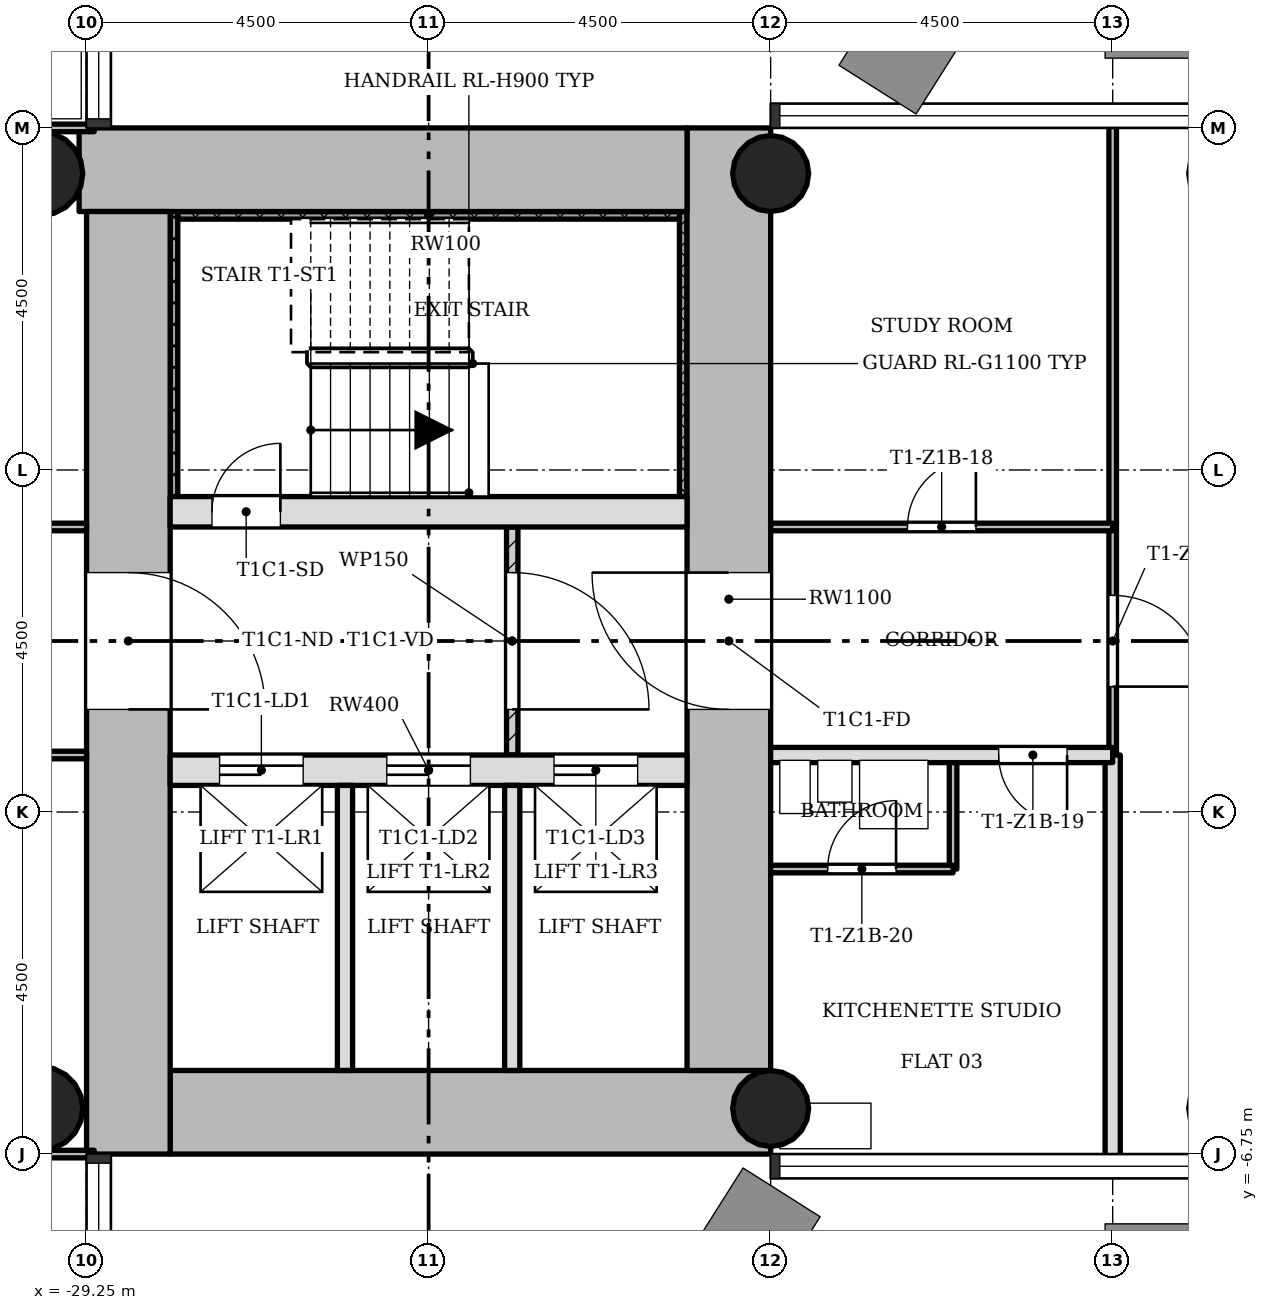
"""IFC4 building model, lengths in metres.
Left out: names, types, materials, properties, quantities, classifications, styles, units other than length and angle.
Written with IfcOpenShell. Run it as: python <this file> out.ifc"""

import sys

from ifc_helpers import new_model, si_unit, direction, frame, frame_2d, origin, origin_2d, place, context, subcontext, project, spatial, rectangle, hollow_circle, extrude, element, fill, save


model = new_model("IFC4")
c1 = context("Model", 3, precision=1e-05, world=origin(), true_north=direction((0.0, 1.0)))
c2 = subcontext(c1, "Body", "Model", "MODEL_VIEW")
j1 = project(units=[si_unit("LENGTHUNIT", "METRE"), si_unit("PLANEANGLEUNIT", "RADIAN")], contexts=[c1])
p1 = place(None, origin())
s1 = spatial("IfcSite", under=j1, at=p1, CompositionType="ELEMENT")
p2 = place(p1, origin())
s2 = spatial("IfcBuilding", under=s1, at=p2, CompositionType="ELEMENT")
p3 = place(p2, frame((0.0, 0.0, 38.1)))
s3 = spatial("IfcBuildingStorey", under=s2, at=p3, CompositionType="ELEMENT", Elevation=38.1)
p4 = place(p3, frame((-28.15, -6.2, 0.0), z_axis=(0.0, 0.0, 1.0), x_axis=(1.0, 0.0, 0.0)))
e1 = element("IfcWall", 1, at=p4, inside=s3, PredefinedType="SHEAR", context=c2, shape_type="SweptSolid", body=[
    extrude(rectangle(XDim=7.9, YDim=1.1, at=frame_2d((3.95, 0.0))), origin(), (0.0, 0.0, 1.0), 3.4),
])
p5 = place(p3, frame((-20.8, -5.65, 0.0), z_axis=(0.0, 0.0, 1.0), x_axis=(0.0, 1.0, 0.0)))
e2 = element("IfcWall", 2, at=p5, inside=s3, PredefinedType="SHEAR", context=c2, shape_type="SweptSolid", body=[
    extrude(rectangle(XDim=12.4, YDim=1.1, at=frame_2d((6.2, 0.0))), origin(), (0.0, 0.0, 1.0), 3.4),
])
p6 = place(p5, frame((4.75, 0.0, 0.0)))
e3 = element("IfcOpeningElement", 3, at=p6, cuts=e2, PredefinedType="OPENING", context=c2, shape_type="SweptSolid", body=[
    extrude(rectangle(XDim=1.8, YDim=2.1, at=frame_2d((0.9, 1.05))), frame((0.0, 0.56, 0.0), z_axis=(0.0, -1.0, 0.0), x_axis=(1.0, 0.0, 0.0)), (0.0, 0.0, 1.0), 1.12),
])
p7 = place(p3, frame((-21.35, 6.2, 0.0), z_axis=(0.0, 0.0, 1.0), x_axis=(-1.0, 0.0, 0.0)))
e4 = element("IfcWall", 4, at=p7, inside=s3, PredefinedType="SHEAR", context=c2, shape_type="SweptSolid", body=[
    extrude(rectangle(XDim=7.998, YDim=1.1, at=frame_2d((3.999, 0.0))), origin(), (0.0, 0.0, 1.0), 3.4),
])
p8 = place(p3, frame((-28.7, 5.65, 0.0), z_axis=(0.0, 0.0, 1.0), x_axis=(0.0, -1.0, 0.0)))
e5 = element("IfcWall", 5, at=p8, inside=s3, PredefinedType="SHEAR", context=c2, shape_type="SweptSolid", body=[
    extrude(rectangle(XDim=12.4, YDim=1.1, at=frame_2d((6.2, 0.0))), origin(), (0.0, 0.0, 1.0), 3.4),
])
p9 = place(p8, frame((4.75, 0.0, 0.0)))
e6 = element("IfcOpeningElement", 6, at=p9, cuts=e5, PredefinedType="OPENING", context=c2, shape_type="SweptSolid", body=[
    extrude(rectangle(XDim=1.8, YDim=2.1, at=frame_2d((0.9, 1.05))), frame((0.0, 0.56, 0.0), z_axis=(0.0, -1.0, 0.0), x_axis=(1.0, 0.0, 0.0)), (0.0, 0.0, 1.0), 1.12),
])
p10 = place(p3, frame((-28.15, -1.7, 0.0), z_axis=(0.0, 0.0, 1.0), x_axis=(1.0, 0.0, 0.0)))
e7 = element("IfcWall", 7, at=p10, inside=s3, PredefinedType="SHEAR", context=c2, shape_type="SweptSolid", body=[
    extrude(rectangle(XDim=6.8, YDim=0.4, at=frame_2d((3.4, 0.0))), origin(), (0.0, 0.0, 1.0), 3.4),
])
p11 = place(p10, frame((0.65, 0.0, 0.0)))
e8 = element("IfcOpeningElement", 8, at=p11, cuts=e7, PredefinedType="OPENING", context=c2, shape_type="SweptSolid", body=[
    extrude(rectangle(XDim=1.1, YDim=2.1, at=frame_2d((0.55, 1.05))), frame((0.0, 0.21, 0.0), z_axis=(0.0, -1.0, 0.0), x_axis=(1.0, 0.0, 0.0)), (0.0, 0.0, 1.0), 0.42),
])
p12 = place(p10, frame((2.85, 0.0, 0.0)))
e9 = element("IfcOpeningElement", 9, at=p12, cuts=e7, PredefinedType="OPENING", context=c2, shape_type="SweptSolid", body=[
    extrude(rectangle(XDim=1.1, YDim=2.1, at=frame_2d((0.55, 1.05))), frame((0.0, 0.21, 0.0), z_axis=(0.0, -1.0, 0.0), x_axis=(1.0, 0.0, 0.0)), (0.0, 0.0, 1.0), 0.42),
])
p13 = place(p10, frame((5.05, 0.0, 0.0)))
e10 = element("IfcOpeningElement", 10, at=p13, cuts=e7, PredefinedType="OPENING", context=c2, shape_type="SweptSolid", body=[
    extrude(rectangle(XDim=1.1, YDim=2.1, at=frame_2d((0.55, 1.05))), frame((0.0, 0.21, 0.0), z_axis=(0.0, -1.0, 0.0), x_axis=(1.0, 0.0, 0.0)), (0.0, 0.0, 1.0), 0.42),
])
p14 = place(p3, frame((-28.15, 1.7, 0.0), z_axis=(0.0, 0.0, 1.0), x_axis=(1.0, 0.0, 0.0)))
e11 = element("IfcWall", 11, at=p14, inside=s3, PredefinedType="SHEAR", context=c2, shape_type="SweptSolid", body=[
    extrude(rectangle(XDim=6.8, YDim=0.4, at=frame_2d((3.4, 0.0))), origin(), (0.0, 0.0, 1.0), 3.4),
])
p15 = place(p14, frame((0.55, 0.0, 0.0)))
e12 = element("IfcOpeningElement", 12, at=p15, cuts=e11, PredefinedType="OPENING", context=c2, shape_type="SweptSolid", body=[
    extrude(rectangle(XDim=0.9, YDim=2.1, at=frame_2d((0.45, 1.05))), frame((0.0, 0.21, 0.0), z_axis=(0.0, -1.0, 0.0), x_axis=(1.0, 0.0, 0.0)), (0.0, 0.0, 1.0), 0.42),
])
for number, where, z_axis, x_axis in (
    (13, (-20.25, -6.15, 0.0), (0.0, 0.0, 1.0), (1.0, 0.0, 0.0)),
    (14, (-20.25, 6.15, 0.0), (0.0, 0.0, 1.0), (1.0, 0.0, 0.0)),
):
    element("IfcColumn", number, at=place(p3, frame(where, z_axis=z_axis, x_axis=x_axis)), inside=s3, PredefinedType="COLUMN", context=c2, shape_type="SweptSolid", body=[
        extrude(hollow_circle(Radius=0.5, WallThickness=0.036, at=origin_2d()), origin(), (0.0, 0.0, 1.0), 3.4),
    ])
for number, where, z_axis, x_axis in (
    (15, (-29.85, -6.15, 0.0), (0.0, 0.0, 1.0), (1.0, 0.0, 0.0)),
    (16, (-29.85, 6.15, 0.0), (0.0, 0.0, 1.0), (1.0, 0.0, 0.0)),
):
    element("IfcColumn", number, at=place(p3, frame(where, z_axis=z_axis, x_axis=x_axis)), inside=s3, PredefinedType="COLUMN", context=c2, shape_type="SweptSolid", body=[
        extrude(hollow_circle(Radius=0.55, WallThickness=0.04, at=origin_2d()), origin(), (0.0, 0.0, 1.0), 3.4),
    ])
p16 = place(p3, frame((-23.65, -1.5, 0.0), z_axis=(0.0, 0.0, 1.0), x_axis=(0.0, 1.0, 0.0)))
e17 = element("IfcWall", 17, at=p16, inside=s3, PredefinedType="PARTITIONING", context=c2, shape_type="SweptSolid", body=[
    extrude(rectangle(XDim=3.0, YDim=0.15, at=frame_2d((1.5, 0.0))), origin(), (0.0, 0.0, 1.0), 3.0),
])
p17 = place(p16, frame((0.6, 0.0, 0.0)))
e18 = element("IfcOpeningElement", 18, at=p17, cuts=e17, PredefinedType="OPENING", context=c2, shape_type="SweptSolid", body=[
    extrude(rectangle(XDim=1.8, YDim=2.1, at=frame_2d((0.9, 1.05))), frame((0.0, 0.085, 0.0), z_axis=(0.0, -1.0, 0.0), x_axis=(1.0, 0.0, 0.0)), (0.0, 0.0, 1.0), 0.17),
])
for number, where, z_axis, x_axis in (
    (19, (-25.85, -5.65, 0.0), (0.0, 0.0, 1.0), (0.0, 1.0, 0.0)),
    (20, (-23.65, -5.65, 0.0), (0.0, 0.0, 1.0), (0.0, 1.0, 0.0)),
):
    element("IfcWall", number, at=place(p3, frame(where, z_axis=z_axis, x_axis=x_axis)), inside=s3, PredefinedType="SOLIDWALL", context=c2, shape_type="SweptSolid", body=[
        extrude(rectangle(XDim=3.75, YDim=0.2, at=frame_2d((1.875, 0.0))), origin(), (0.0, 0.0, 1.0), 3.0),
    ])
p18 = place(p3, frame((-17.85, -3.0, 0.0), z_axis=(0.0, 0.0, 1.0), x_axis=(0.0, 1.0, 0.0)))
e21 = element("IfcWall", 21, at=p18, inside=s3, PredefinedType="PARTITIONING", context=c2, shape_type="SweptSolid", body=[
    extrude(rectangle(XDim=1.5, YDim=0.1, at=frame_2d((0.75, 0.0))), origin(), (0.0, 0.0, 1.0), 3.0),
])
p19 = place(p3, frame((-15.75, -1.5, 0.0), z_axis=(0.0, 0.0, 1.0), x_axis=(0.0, 1.0, 0.0)))
e22 = element("IfcWall", 22, at=p19, inside=s3, PredefinedType="PARTITIONING", context=c2, shape_type="SweptSolid", body=[
    extrude(rectangle(XDim=8.35, YDim=0.1, at=frame_2d((4.175, 0.0))), origin(), (0.0, 0.0, 1.0), 3.0),
])
p20 = place(p19, frame((0.9, 0.0, 0.0)))
e23 = element("IfcOpeningElement", 23, at=p20, cuts=e22, PredefinedType="OPENING", context=c2, shape_type="SweptSolid", body=[
    extrude(rectangle(XDim=1.2, YDim=2.1, at=frame_2d((0.6, 1.05))), frame((0.0, 0.06, 0.0), z_axis=(0.0, -1.0, 0.0), x_axis=(1.0, 0.0, 0.0)), (0.0, 0.0, 1.0), 0.12),
])
p21 = place(p3, frame((-15.75, -6.85, 0.0), z_axis=(0.0, 0.0, 1.0), x_axis=(0.0, 1.0, 0.0)))
e24 = element("IfcWall", 24, at=p21, inside=s3, PredefinedType="SOLIDWALL", context=c2, shape_type="SweptSolid", body=[
    extrude(rectangle(XDim=5.35, YDim=0.2, at=frame_2d((2.675, 0.0))), origin(), (0.0, 0.0, 1.0), 3.0),
])
p22 = place(p3, frame((-35.1, -6.75, 0.0), z_axis=(0.0, 0.0, 1.0), x_axis=(1.0, 0.0, 0.0)))
e25 = element("IfcWall", 25, at=p22, inside=s3, PredefinedType="PARTITIONING", context=c2, shape_type="SweptSolid", body=[
    extrude(rectangle(XDim=5.95, YDim=0.1, at=frame_2d((2.975, 0.0))), origin(), (0.0, 0.0, 1.0), 3.0),
])
p23 = place(p3, frame((-20.25, -3.0, 0.0), z_axis=(0.0, 0.0, 1.0), x_axis=(1.0, 0.0, 0.0)))
e26 = element("IfcWall", 26, at=p23, inside=s3, PredefinedType="PARTITIONING", context=c2, shape_type="SweptSolid", body=[
    extrude(rectangle(XDim=2.4, YDim=0.1, at=frame_2d((1.2, 0.0))), origin(), (0.0, 0.0, 1.0), 3.0),
])
p24 = place(p23, frame((0.75, 0.0, 0.0)))
e27 = element("IfcOpeningElement", 27, at=p24, cuts=e26, PredefinedType="OPENING", context=c2, shape_type="SweptSolid", body=[
    extrude(rectangle(XDim=0.9, YDim=2.1, at=frame_2d((0.45, 1.05))), frame((0.0, 0.06, 0.0), z_axis=(0.0, -1.0, 0.0), x_axis=(1.0, 0.0, 0.0)), (0.0, 0.0, 1.0), 0.12),
])
p25 = place(p3, frame((-35.1, -1.5, 0.0), z_axis=(0.0, 0.0, 1.0), x_axis=(1.0, 0.0, 0.0)))
e28 = element("IfcWall", 28, at=p25, inside=s3, PredefinedType="PARTITIONING", context=c2, shape_type="SweptSolid", body=[
    extrude(rectangle(XDim=5.85, YDim=0.1, at=frame_2d((2.925, 0.0))), origin(), (0.0, 0.0, 1.0), 3.0),
])
p26 = place(p25, frame((2.475, 0.0, 0.0)))
e29 = element("IfcOpeningElement", 29, at=p26, cuts=e28, PredefinedType="OPENING", context=c2, shape_type="SweptSolid", body=[
    extrude(rectangle(XDim=0.9, YDim=2.1, at=frame_2d((0.45, 1.05))), frame((0.0, 0.06, 0.0), z_axis=(0.0, -1.0, 0.0), x_axis=(1.0, 0.0, 0.0)), (0.0, 0.0, 1.0), 0.12),
])
p27 = place(p3, frame((-20.25, -1.5, 0.0), z_axis=(0.0, 0.0, 1.0), x_axis=(1.0, 0.0, 0.0)))
e30 = element("IfcWall", 30, at=p27, inside=s3, PredefinedType="SOLIDWALL", context=c2, shape_type="SweptSolid", body=[
    extrude(rectangle(XDim=4.5, YDim=0.2, at=frame_2d((2.25, 0.0))), origin(), (0.0, 0.0, 1.0), 3.0),
])
p28 = place(p27, frame((3.0, 0.0, 0.0)))
e31 = element("IfcOpeningElement", 31, at=p28, cuts=e30, PredefinedType="OPENING", context=c2, shape_type="SweptSolid", body=[
    extrude(rectangle(XDim=0.9, YDim=2.1, at=frame_2d((0.45, 1.05))), frame((0.0, 0.11, 0.0), z_axis=(0.0, -1.0, 0.0), x_axis=(1.0, 0.0, 0.0)), (0.0, 0.0, 1.0), 0.22),
])
p29 = place(p3, frame((-35.1, 1.5, 0.0), z_axis=(0.0, 0.0, 1.0), x_axis=(1.0, 0.0, 0.0)))
e32 = element("IfcWall", 32, at=p29, inside=s3, PredefinedType="PARTITIONING", context=c2, shape_type="SweptSolid", body=[
    extrude(rectangle(XDim=5.85, YDim=0.1, at=frame_2d((2.925, 0.0))), origin(), (0.0, 0.0, 1.0), 3.0),
])
p30 = place(p29, frame((3.375, 0.0, 0.0)))
e33 = element("IfcOpeningElement", 33, at=p30, cuts=e32, PredefinedType="OPENING", context=c2, shape_type="SweptSolid", body=[
    extrude(rectangle(XDim=0.9, YDim=2.1, at=frame_2d((0.45, 1.05))), frame((0.0, 0.06, 0.0), z_axis=(0.0, -1.0, 0.0), x_axis=(1.0, 0.0, 0.0)), (0.0, 0.0, 1.0), 0.12),
])
p31 = place(p3, frame((-20.25, 1.5, 0.0), z_axis=(0.0, 0.0, 1.0), x_axis=(1.0, 0.0, 0.0)))
e34 = element("IfcWall", 34, at=p31, inside=s3, PredefinedType="PARTITIONING", context=c2, shape_type="SweptSolid", body=[
    extrude(rectangle(XDim=4.5, YDim=0.1, at=frame_2d((2.25, 0.0))), origin(), (0.0, 0.0, 1.0), 3.0),
])
p32 = place(p31, frame((1.8, 0.0, 0.0)))
e35 = element("IfcOpeningElement", 35, at=p32, cuts=e34, PredefinedType="OPENING", context=c2, shape_type="SweptSolid", body=[
    extrude(rectangle(XDim=0.9, YDim=2.1, at=frame_2d((0.45, 1.05))), frame((0.0, 0.06, 0.0), z_axis=(0.0, -1.0, 0.0), x_axis=(1.0, 0.0, 0.0)), (0.0, 0.0, 1.0), 0.12),
])
p33 = place(p3, frame((-35.1, 6.75, 0.0), z_axis=(0.0, 0.0, 1.0), x_axis=(1.0, 0.0, 0.0)))
e36 = element("IfcWall", 36, at=p33, inside=s3, PredefinedType="PARTITIONING", context=c2, shape_type="SweptSolid", body=[
    extrude(rectangle(XDim=5.95, YDim=0.1, at=frame_2d((2.975, 0.0))), origin(), (0.0, 0.0, 1.0), 3.0),
])
p34 = place(p3, frame((-21.4, 1.9, 0.0), z_axis=(0.0, 0.0, 1.0), x_axis=(0.0, 1.0, 0.0)))
e37 = element("IfcWall", 37, at=p34, inside=s3, PredefinedType="SHEAR", context=c2, shape_type="SweptSolid", body=[
    extrude(rectangle(XDim=3.75, YDim=0.1, at=frame_2d((1.875, 0.0))), origin(), (0.0, 0.0, 1.0), 3.4),
])
p35 = place(p3, frame((-28.05, 5.6, 0.0), z_axis=(0.0, 0.0, 1.0), x_axis=(1.0, 0.0, 0.0)))
e38 = element("IfcWall", 38, at=p35, inside=s3, PredefinedType="SHEAR", context=c2, shape_type="SweptSolid", body=[
    extrude(rectangle(XDim=6.6, YDim=0.1, at=frame_2d((3.3, 0.0))), origin(), (0.0, 0.0, 1.0), 3.4),
])
p36 = place(p3, frame((-28.1, 1.9, 0.0), z_axis=(0.0, 0.0, 1.0), x_axis=(0.0, 1.0, 0.0)))
e39 = element("IfcWall", 39, at=p36, inside=s3, PredefinedType="SHEAR", context=c2, shape_type="SweptSolid", body=[
    extrude(rectangle(XDim=3.75, YDim=0.1, at=frame_2d((1.875, 0.0))), origin(), (0.0, 0.0, 1.0), 3.4),
])
p37 = place(p17, origin())
e40 = element("IfcDoor", 40, at=p37, inside=s3, OperationType="SINGLE_SWING_LEFT", PredefinedType="DOOR", context=c2, shape_type="SweptSolid", body=[
    extrude(rectangle(XDim=1.8, YDim=2.1, at=frame_2d((0.9, 1.05))), frame((0.0, 0.025, 0.0), z_axis=(0.0, -1.0, 0.0), x_axis=(1.0, 0.0, 0.0)), (0.0, 0.0, 1.0), 0.05),
])
fill(e18, e40)
p38 = place(p32, origin())
e41 = element("IfcDoor", 41, at=p38, inside=s3, OperationType="SINGLE_SWING_LEFT", PredefinedType="DOOR", context=c2, shape_type="SweptSolid", body=[
    extrude(rectangle(XDim=0.9, YDim=2.1, at=frame_2d((0.45, 1.05))), frame((0.0, 0.025, 0.0), z_axis=(0.0, -1.0, 0.0), x_axis=(1.0, 0.0, 0.0)), (0.0, 0.0, 1.0), 0.05),
])
fill(e35, e41)
p39 = place(p28, origin())
e42 = element("IfcDoor", 42, at=p39, inside=s3, OperationType="SINGLE_SWING_RIGHT", PredefinedType="DOOR", context=c2, shape_type="SweptSolid", body=[
    extrude(rectangle(XDim=0.9, YDim=2.1, at=frame_2d((0.45, 1.05))), frame((0.0, 0.025, 0.0), z_axis=(0.0, -1.0, 0.0), x_axis=(1.0, 0.0, 0.0)), (0.0, 0.0, 1.0), 0.05),
])
fill(e31, e42)
p40 = place(p24, origin())
e43 = element("IfcDoor", 43, at=p40, inside=s3, OperationType="SINGLE_SWING_LEFT", PredefinedType="DOOR", context=c2, shape_type="SweptSolid", body=[
    extrude(rectangle(XDim=0.9, YDim=2.1, at=frame_2d((0.45, 1.05))), frame((0.0, 0.025, 0.0), z_axis=(0.0, -1.0, 0.0), x_axis=(1.0, 0.0, 0.0)), (0.0, 0.0, 1.0), 0.05),
])
fill(e27, e43)
p41 = place(p20, origin())
e44 = element("IfcDoor", 44, at=p41, inside=s3, OperationType="SINGLE_SWING_LEFT", PredefinedType="DOOR", context=c2, shape_type="SweptSolid", body=[
    extrude(rectangle(XDim=1.2, YDim=2.1, at=frame_2d((0.6, 1.05))), frame((0.0, 0.025, 0.0), z_axis=(0.0, -1.0, 0.0), x_axis=(1.0, 0.0, 0.0)), (0.0, 0.0, 1.0), 0.05),
])
fill(e23, e44)
p42 = place(p15, origin())
e45 = element("IfcDoor", 45, at=p42, inside=s3, OperationType="SINGLE_SWING_LEFT", PredefinedType="DOOR", context=c2, shape_type="SweptSolid", body=[
    extrude(rectangle(XDim=0.9, YDim=2.1, at=frame_2d((0.45, 1.05))), frame((0.0, 0.025, 0.0), z_axis=(0.0, -1.0, 0.0), x_axis=(1.0, 0.0, 0.0)), (0.0, 0.0, 1.0), 0.05),
])
fill(e12, e45)
p43 = place(p11, origin())
e46 = element("IfcDoor", 46, at=p43, inside=s3, OperationType="SLIDING_TO_LEFT", PredefinedType="DOOR", context=c2, shape_type="SweptSolid", body=[
    extrude(rectangle(XDim=1.1, YDim=2.1, at=frame_2d((0.55, 1.05))), frame((0.0, 0.025, 0.0), z_axis=(0.0, -1.0, 0.0), x_axis=(1.0, 0.0, 0.0)), (0.0, 0.0, 1.0), 0.05),
])
fill(e8, e46)
p44 = place(p12, origin())
e47 = element("IfcDoor", 47, at=p44, inside=s3, OperationType="SLIDING_TO_LEFT", PredefinedType="DOOR", context=c2, shape_type="SweptSolid", body=[
    extrude(rectangle(XDim=1.1, YDim=2.1, at=frame_2d((0.55, 1.05))), frame((0.0, 0.025, 0.0), z_axis=(0.0, -1.0, 0.0), x_axis=(1.0, 0.0, 0.0)), (0.0, 0.0, 1.0), 0.05),
])
fill(e9, e47)
p45 = place(p13, origin())
e48 = element("IfcDoor", 48, at=p45, inside=s3, OperationType="SLIDING_TO_LEFT", PredefinedType="DOOR", context=c2, shape_type="SweptSolid", body=[
    extrude(rectangle(XDim=1.1, YDim=2.1, at=frame_2d((0.55, 1.05))), frame((0.0, 0.025, 0.0), z_axis=(0.0, -1.0, 0.0), x_axis=(1.0, 0.0, 0.0)), (0.0, 0.0, 1.0), 0.05),
])
fill(e10, e48)
p46 = place(p9, origin())
e49 = element("IfcDoor", 49, at=p46, inside=s3, OperationType="SINGLE_SWING_LEFT", PredefinedType="DOOR", context=c2, shape_type="SweptSolid", body=[
    extrude(rectangle(XDim=1.8, YDim=2.1, at=frame_2d((0.9, 1.05))), frame((0.0, 0.025, 0.0), z_axis=(0.0, -1.0, 0.0), x_axis=(1.0, 0.0, 0.0)), (0.0, 0.0, 1.0), 0.05),
])
fill(e6, e49)
p47 = place(p6, origin())
e50 = element("IfcDoor", 50, at=p47, inside=s3, OperationType="SINGLE_SWING_LEFT", PredefinedType="DOOR", context=c2, shape_type="SweptSolid", body=[
    extrude(rectangle(XDim=1.8, YDim=2.1, at=frame_2d((0.9, 1.05))), frame((0.0, 0.025, 0.0), z_axis=(0.0, -1.0, 0.0), x_axis=(1.0, 0.0, 0.0)), (0.0, 0.0, 1.0), 0.05),
])
fill(e3, e50)
save(model, sys.argv[1])
